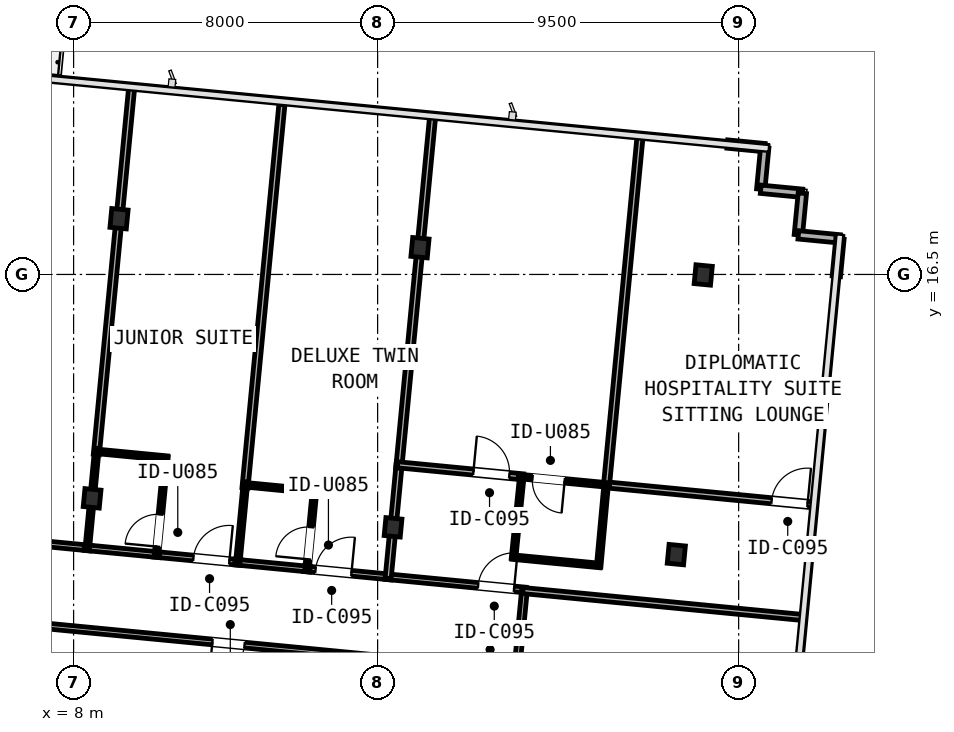
"""IFC4 building model, lengths in metres.
Left out: names, types, materials, properties, quantities, classifications, styles, units other than length and angle.
Written with IfcOpenShell. Run it as: python <this file> out.ifc"""

import sys

from ifc_helpers import new_model, si_unit, direction, frame, frame_2d, origin, origin_2d, place, context, subcontext, project, spatial, rectangle, i_section, extrude, element, fill, save


model = new_model("IFC4")
c1 = context("Model", 3, precision=1e-05, world=origin(), true_north=direction((0.0, 1.0)))
c2 = subcontext(c1, "Body", "Model", "MODEL_VIEW")
j1 = project(units=[si_unit("LENGTHUNIT", "METRE"), si_unit("PLANEANGLEUNIT", "RADIAN")], contexts=[c1])
p1 = place(None, origin())
s1 = spatial("IfcSite", under=j1, at=p1, CompositionType="ELEMENT")
p2 = place(p1, origin())
s2 = spatial("IfcBuilding", under=s1, at=p2, CompositionType="ELEMENT")
p3 = place(p2, frame((0.0, 0.0, 139.35)))
s3 = spatial("IfcBuildingStorey", under=s2, at=p3, CompositionType="ELEMENT", Elevation=139.35)
p4 = place(p3, frame((8.487, 10.609, 0.0), z_axis=(0.0, 0.0, 1.0), x_axis=(0.995396198367, -0.09584575252, 0.0)))
e1 = element("IfcColumn", 1, at=p4, inside=s3, PredefinedType="COLUMN", context=c2, shape_type="SweptSolid", body=[
    extrude(i_section(OverallWidth=0.424, OverallDepth=0.474, WebThickness=0.048, FlangeThickness=0.077, FilletRadius=0.031, at=origin_2d()), origin(), (0.0, 0.0, 1.0), 3.45),
])
p5 = place(p3, frame((9.195, 17.967, 0.0), z_axis=(0.0, 0.0, 1.0), x_axis=(0.995396198367, -0.09584575252, 0.0)))
e2 = element("IfcColumn", 2, at=p5, inside=s3, PredefinedType="COLUMN", context=c2, shape_type="SweptSolid", body=[
    extrude(i_section(OverallWidth=0.432, OverallDepth=0.498, WebThickness=0.056, FlangeThickness=0.089, FilletRadius=0.031, at=origin_2d()), origin(), (0.0, 0.0, 1.0), 3.45),
])
p6 = place(p3, frame((16.406, 9.846, 0.0), z_axis=(0.0, 0.0, 1.0), x_axis=(0.995396198367, -0.09584575252, 0.0)))
e3 = element("IfcColumn", 3, at=p6, inside=s3, PredefinedType="COLUMN", context=c2, shape_type="SweptSolid", body=[
    extrude(i_section(OverallWidth=0.424, OverallDepth=0.474, WebThickness=0.048, FlangeThickness=0.077, FilletRadius=0.031, at=origin_2d()), origin(), (0.0, 0.0, 1.0), 3.45),
])
for number, where, z_axis, x_axis in (
    (4, (17.115, 17.204, 0.0), (0.0, 0.0, 1.0), (0.995, -0.096, 0.0)),
    (5, (23.86, 9.128, 0.0), (0.0, 0.0, 1.0), (0.995, -0.096, 0.0)),
    (6, (24.568, 16.486, 0.0), (0.0, 0.0, 1.0), (0.995, -0.096, 0.0)),
):
    element("IfcColumn", number, at=place(p3, frame(where, z_axis=z_axis, x_axis=x_axis)), inside=s3, PredefinedType="COLUMN", context=c2, shape_type="SweptSolid", body=[
        extrude(i_section(OverallWidth=0.432, OverallDepth=0.498, WebThickness=0.056, FlangeThickness=0.089, FilletRadius=0.031, at=origin_2d()), origin(), (0.0, 0.0, 1.0), 3.45),
    ])
p7 = place(p3, frame((25.201, 19.931, 0.0), z_axis=(0.0, 0.0, 1.0), x_axis=(0.99541083642, -0.095693608655, 0.0)))
e7 = element("IfcWall", 7, at=p7, inside=s3, PredefinedType="STANDARD", context=c2, shape_type="SweptSolid", body=[
    extrude(rectangle(XDim=0.99, YDim=0.22, at=frame_2d((0.495, 0.0))), origin(), (0.0, 0.0, 1.0), 3.19),
])
p8 = place(p3, frame((26.187, 19.837, 0.0), z_axis=(0.0, 0.0, 1.0), x_axis=(-0.095657429048, -0.995414313875, 0.0)))
e8 = element("IfcWall", 8, at=p8, inside=s3, PredefinedType="STANDARD", context=c2, shape_type="SweptSolid", body=[
    extrude(rectangle(XDim=1.1, YDim=0.22, at=frame_2d((0.55, 0.0))), origin(), (0.0, 0.0, 1.0), 3.19),
])
p9 = place(p3, frame((26.082, 18.742, 0.0), z_axis=(0.0, 0.0, 1.0), x_axis=(0.995391116058, -0.095898519656, 0.0)))
e9 = element("IfcWall", 9, at=p9, inside=s3, PredefinedType="STANDARD", context=c2, shape_type="SweptSolid", body=[
    extrude(rectangle(XDim=1.1, YDim=0.22, at=frame_2d((0.55, 0.0))), origin(), (0.0, 0.0, 1.0), 3.19),
])
p10 = place(p3, frame((27.176, 18.636, 0.0), z_axis=(0.0, 0.0, 1.0), x_axis=(-0.095657429048, -0.995414313875, 0.0)))
e10 = element("IfcWall", 10, at=p10, inside=s3, PredefinedType="STANDARD", context=c2, shape_type="SweptSolid", body=[
    extrude(rectangle(XDim=1.1, YDim=0.22, at=frame_2d((0.55, 0.0))), origin(), (0.0, 0.0, 1.0), 3.19),
])
p11 = place(p3, frame((27.071, 17.541, 0.0), z_axis=(0.0, 0.0, 1.0), x_axis=(0.995391116058, -0.095898519656, 0.0)))
e11 = element("IfcWall", 11, at=p11, inside=s3, PredefinedType="STANDARD", context=c2, shape_type="SweptSolid", body=[
    extrude(rectangle(XDim=1.1, YDim=0.22, at=frame_2d((0.55, 0.0))), origin(), (0.0, 0.0, 1.0), 3.19),
])
p12 = place(p3, frame((28.166, 17.436, 0.0), z_axis=(0.0, 0.0, 1.0), x_axis=(-0.095693608655, -0.99541083642, 0.0)))
e12 = element("IfcWall", 12, at=p12, inside=s3, PredefinedType="STANDARD", context=c2, shape_type="SweptSolid", body=[
    extrude(rectangle(XDim=0.99, YDim=0.22, at=frame_2d((0.495, 0.0))), origin(), (0.0, 0.0, 1.0), 3.19),
])
p13 = place(p3, frame((2.799, 9.842, 0.0), z_axis=(0.0, 0.0, 1.0), x_axis=(0.995395844771, -0.095849424686, 0.0)))
e13 = element("IfcWall", 13, at=p13, inside=s3, PredefinedType="PARTITIONING", context=c2, shape_type="SweptSolid", body=[
    extrude(rectangle(XDim=5.67, YDim=0.15, at=frame_2d((2.835, 0.0))), origin(), (0.0, 0.0, 1.0), 2.479),
])
p14 = place(p13, frame((1.186, 0.0, 0.0)))
e14 = element("IfcOpeningElement", 14, at=p14, cuts=e13, PredefinedType="OPENING", context=c2, shape_type="SweptSolid", body=[
    extrude(rectangle(XDim=0.95, YDim=2.15, at=frame_2d((0.475, 1.075))), frame((0.0, 0.085, 0.0), z_axis=(0.0, -1.0, 0.0), x_axis=(1.0, 0.0, 0.0)), (0.0, 0.0, 1.0), 0.17),
])
p15 = place(p3, frame((10.101, 9.139, 0.0), z_axis=(0.0, 0.0, 1.0), x_axis=(0.995393345625, -0.095875374756, 0.0)))
e15 = element("IfcWall", 15, at=p15, inside=s3, PredefinedType="PARTITIONING", context=c2, shape_type="SweptSolid", body=[
    extrude(rectangle(XDim=2.312, YDim=0.15, at=frame_2d((1.156, 0.0))), origin(), (0.0, 0.0, 1.0), 2.718),
])
p16 = place(p15, frame((1.056, 0.0, 0.0)))
e16 = element("IfcOpeningElement", 16, at=p16, cuts=e15, PredefinedType="OPENING", context=c2, shape_type="SweptSolid", body=[
    extrude(rectangle(XDim=0.95, YDim=2.15, at=frame_2d((0.475, 1.075))), frame((0.0, 0.085, 0.0), z_axis=(0.0, -1.0, 0.0), x_axis=(1.0, 0.0, 0.0)), (0.0, 0.0, 1.0), 0.17),
])
p17 = place(p3, frame((8.28, 9.314, 0.0), z_axis=(0.0, 0.0, 1.0), x_axis=(0.995393086543, -0.095878064554, 0.0)))
e17 = element("IfcWall", 17, at=p17, inside=s3, PredefinedType="PARTITIONING", context=c2, shape_type="SweptSolid", body=[
    extrude(rectangle(XDim=1.994, YDim=0.15, at=frame_2d((0.997, 0.0))), origin(), (0.0, 0.0, 1.0), 2.479),
])
p18 = place(p3, frame((14.061, 8.758, 0.0), z_axis=(0.0, 0.0, 1.0), x_axis=(0.995393345625, -0.095875374756, 0.0)))
e18 = element("IfcWall", 18, at=p18, inside=s3, PredefinedType="PARTITIONING", context=c2, shape_type="SweptSolid", body=[
    extrude(rectangle(XDim=2.312, YDim=0.15, at=frame_2d((1.156, 0.0))), origin(), (0.0, 0.0, 1.0), 2.479),
])
p19 = place(p18, frame((0.306, 0.0, 0.0)))
e19 = element("IfcOpeningElement", 19, at=p19, cuts=e18, PredefinedType="OPENING", context=c2, shape_type="SweptSolid", body=[
    extrude(rectangle(XDim=0.95, YDim=2.15, at=frame_2d((0.475, 1.075))), frame((0.0, 0.085, 0.0), z_axis=(0.0, -1.0, 0.0), x_axis=(1.0, 0.0, 0.0)), (0.0, 0.0, 1.0), 0.17),
])
p20 = place(p3, frame((12.24, 8.933, 0.0), z_axis=(0.0, 0.0, 1.0), x_axis=(0.995405888026, -0.095745068196, 0.0)))
e20 = element("IfcWall", 20, at=p20, inside=s3, PredefinedType="PARTITIONING", context=c2, shape_type="SweptSolid", body=[
    extrude(rectangle(XDim=1.994, YDim=0.15, at=frame_2d((0.997, 0.0))), origin(), (0.0, 0.0, 1.0), 2.718),
])
p21 = place(p3, frame((16.199, 8.552, 0.0), z_axis=(0.0, 0.0, 1.0), x_axis=(0.995391104887, -0.095898635608, 0.0)))
e21 = element("IfcWall", 21, at=p21, inside=s3, PredefinedType="PARTITIONING", context=c2, shape_type="SweptSolid", body=[
    extrude(rectangle(XDim=3.722, YDim=0.15, at=frame_2d((1.861, 0.0))), origin(), (0.0, 0.0, 1.0), 2.479),
])
p22 = place(p21, frame((2.457, 0.0, 0.0)))
e22 = element("IfcOpeningElement", 22, at=p22, cuts=e21, PredefinedType="OPENING", context=c2, shape_type="SweptSolid", body=[
    extrude(rectangle(XDim=0.95, YDim=2.15, at=frame_2d((0.475, 1.075))), frame((0.0, 0.085, 0.0), z_axis=(0.0, -1.0, 0.0), x_axis=(1.0, 0.0, 0.0)), (0.0, 0.0, 1.0), 0.17),
])
p23 = place(p3, frame((16.156, 6.396, 0.0), z_axis=(0.0, 0.0, 1.0), x_axis=(-0.99539478422, 0.095860437863, 0.0)))
e23 = element("IfcWall", 23, at=p23, inside=s3, PredefinedType="PARTITIONING", context=c2, shape_type="SweptSolid", body=[
    extrude(rectangle(XDim=10.936, YDim=0.15, at=frame_2d((5.468, 0.0))), origin(), (0.0, 0.0, 1.0), 2.479),
])
p24 = place(p23, frame((3.675, 0.0, 0.0)))
e24 = element("IfcOpeningElement", 24, at=p24, cuts=e23, PredefinedType="OPENING", context=c2, shape_type="SweptSolid", body=[
    extrude(rectangle(XDim=0.85, YDim=2.05, at=frame_2d((0.425, 1.025))), frame((0.0, 0.085, 0.0), z_axis=(0.0, -1.0, 0.0), x_axis=(1.0, 0.0, 0.0)), (0.0, 0.0, 1.0), 0.17),
])
p25 = place(p3, frame((19.866, 8.219, 0.0), z_axis=(0.0, 0.0, 1.0), x_axis=(-0.095773447772, -0.995403157872, 0.0)))
e25 = element("IfcWall", 25, at=p25, inside=s3, PredefinedType="PARTITIONING", context=c2, shape_type="SweptSolid", body=[
    extrude(rectangle(XDim=2.21, YDim=0.15, at=frame_2d((1.105, 0.0))), origin(), (0.0, 0.0, 1.0), 2.718),
])
p26 = place(p3, frame((9.178, 17.791, 0.0), z_axis=(0.0, 0.0, 1.0), x_axis=(-0.095826863488, -0.995398016993, 0.0)))
e26 = element("IfcWall", 26, at=p26, inside=s3, PredefinedType="PARTITIONING", context=c2, shape_type="SweptSolid", body=[
    extrude(rectangle(XDim=6.056, YDim=0.16, at=frame_2d((3.028, 0.0))), origin(), (0.0, 0.0, 1.0), 2.479),
])
p27 = place(p3, frame((9.533, 21.47, 0.0), z_axis=(0.0, 0.0, 1.0), x_axis=(-0.095859866796, -0.995394839216, 0.0)))
e27 = element("IfcWall", 27, at=p27, inside=s3, PredefinedType="PARTITIONING", context=c2, shape_type="SweptSolid", body=[
    extrude(rectangle(XDim=3.344, YDim=0.16, at=frame_2d((1.672, 0.0))), origin(), (0.0, 0.0, 1.0), 3.19),
])
p28 = place(p3, frame((8.47, 10.433, 0.0), z_axis=(0.0, 0.0, 1.0), x_axis=(-0.095831494917, -0.995397571115, 0.0)))
e28 = element("IfcWall", 28, at=p28, inside=s3, PredefinedType="PARTITIONING", context=c2, shape_type="SweptSolid", body=[
    extrude(rectangle(XDim=1.172, YDim=0.12, at=frame_2d((0.586, 0.0))), origin(), (0.0, 0.0, 1.0), 2.479),
])
p29 = place(p3, frame((8.614, 11.927, 0.0), z_axis=(0.0, 0.0, 1.0), x_axis=(-0.09590284245, -0.99539069958, 0.0)))
e29 = element("IfcWall", 29, at=p29, inside=s3, PredefinedType="PARTITIONING", context=c2, shape_type="SweptSolid", body=[
    extrude(rectangle(XDim=1.148, YDim=0.12, at=frame_2d((0.574, 0.0))), origin(), (0.0, 0.0, 1.0), 2.479),
])
p30 = place(p3, frame((10.179, 9.091, 0.0), z_axis=(0.0, 0.0, 1.0), x_axis=(0.095799078022, 0.995400691506, 0.0)))
e30 = element("IfcWall", 30, at=p30, inside=s3, PredefinedType="PARTITIONING", context=c2, shape_type="SweptSolid", body=[
    extrude(rectangle(XDim=2.63, YDim=0.12, at=frame_2d((1.315, 0.0))), origin(), (0.0, 0.0, 1.0), 2.479),
])
p31 = place(p30, frame((0.247, 0.0, 0.0)))
e31 = element("IfcOpeningElement", 31, at=p31, cuts=e30, PredefinedType="OPENING", context=c2, shape_type="SweptSolid", body=[
    extrude(rectangle(XDim=0.85, YDim=2.1, at=frame_2d((0.425, 1.05))), frame((0.0, 0.07, 0.0), z_axis=(0.0, -1.0, 0.0), x_axis=(1.0, 0.0, 0.0)), (0.0, 0.0, 1.0), 0.14),
])
p32 = place(p3, frame((10.467, 11.666, 0.0), z_axis=(0.0, 0.0, 1.0), x_axis=(-0.995405983929, 0.095744071139, 0.0)))
e32 = element("IfcWall", 32, at=p32, inside=s3, PredefinedType="PARTITIONING", context=c2, shape_type="SweptSolid", body=[
    extrude(rectangle(XDim=1.91, YDim=0.12, at=frame_2d((0.955, 0.0))), origin(), (0.0, 0.0, 1.0), 2.479),
])
p33 = place(p3, frame((13.481, 20.97, 0.0), z_axis=(0.0, 0.0, 1.0), x_axis=(-0.095852900965, -0.995395510024, 0.0)))
e33 = element("IfcWall", 33, at=p33, inside=s3, PredefinedType="PARTITIONING", context=c2, shape_type="SweptSolid", body=[
    extrude(rectangle(XDim=10.132, YDim=0.16, at=frame_2d((5.066, 0.0))), origin(), (0.0, 0.0, 1.0), 2.557),
])
p34 = place(p3, frame((12.526, 11.048, 0.0), z_axis=(0.0, 0.0, 1.0), x_axis=(-0.095875173929, -0.995393364969, 0.0)))
e34 = element("IfcWall", 34, at=p34, inside=s3, PredefinedType="PARTITIONING", context=c2, shape_type="SweptSolid", body=[
    extrude(rectangle(XDim=2.172, YDim=0.12, at=frame_2d((1.086, 0.0))), origin(), (0.0, 0.0, 1.0), 2.479),
])
p35 = place(p3, frame((14.139, 8.71, 0.0), z_axis=(0.0, 0.0, 1.0), x_axis=(0.095825980341, 0.995398102013, 0.0)))
e35 = element("IfcWall", 35, at=p35, inside=s3, PredefinedType="PARTITIONING", context=c2, shape_type="SweptSolid", body=[
    extrude(rectangle(XDim=2.13, YDim=0.12, at=frame_2d((1.065, 0.0))), origin(), (0.0, 0.0, 1.0), 2.479),
])
p36 = place(p35, frame((0.296, 0.0, 0.0)))
e36 = element("IfcOpeningElement", 36, at=p36, cuts=e35, PredefinedType="OPENING", context=c2, shape_type="SweptSolid", body=[
    extrude(rectangle(XDim=0.85, YDim=2.1, at=frame_2d((0.425, 1.05))), frame((0.0, 0.07, 0.0), z_axis=(0.0, -1.0, 0.0), x_axis=(1.0, 0.0, 0.0)), (0.0, 0.0, 1.0), 0.14),
])
p37 = place(p3, frame((14.379, 10.787, 0.0), z_axis=(0.0, 0.0, 1.0), x_axis=(-0.995393793358, 0.095870726213, 0.0)))
e37 = element("IfcWall", 37, at=p37, inside=s3, PredefinedType="PARTITIONING", context=c2, shape_type="SweptSolid", body=[
    extrude(rectangle(XDim=1.91, YDim=0.12, at=frame_2d((0.955, 0.0))), origin(), (0.0, 0.0, 1.0), 2.718),
])
p38 = place(p3, frame((16.389, 9.671, 0.0), z_axis=(0.0, 0.0, 1.0), x_axis=(-0.095811626391, -0.995399483749, 0.0)))
e38 = element("IfcWall", 38, at=p38, inside=s3, PredefinedType="PARTITIONING", context=c2, shape_type="SweptSolid", body=[
    extrude(rectangle(XDim=1.172, YDim=0.16, at=frame_2d((0.586, 0.0))), origin(), (0.0, 0.0, 1.0), 2.479),
])
p39 = place(p3, frame((16.572, 11.57, 0.0), z_axis=(0.0, 0.0, 1.0), x_axis=(-0.095867871334, -0.99539406832, 0.0)))
e39 = element("IfcWall", 39, at=p39, inside=s3, PredefinedType="PARTITIONING", context=c2, shape_type="SweptSolid", body=[
    extrude(rectangle(XDim=1.556, YDim=0.16, at=frame_2d((0.778, 0.0))), origin(), (0.0, 0.0, 1.0), 2.479),
])
p40 = place(p3, frame((17.098, 17.029, 0.0), z_axis=(0.0, 0.0, 1.0), x_axis=(-0.095831010877, -0.995397617716, 0.0)))
e40 = element("IfcWall", 40, at=p40, inside=s3, PredefinedType="PARTITIONING", context=c2, shape_type="SweptSolid", body=[
    extrude(rectangle(XDim=5.648, YDim=0.16, at=frame_2d((2.824, 0.0))), origin(), (0.0, 0.0, 1.0), 2.479),
])
p41 = place(p3, frame((17.452, 20.708, 0.0), z_axis=(0.0, 0.0, 1.0), x_axis=(-0.095859866796, -0.995394839216, 0.0)))
e41 = element("IfcWall", 41, at=p41, inside=s3, PredefinedType="PARTITIONING", context=c2, shape_type="SweptSolid", body=[
    extrude(rectangle(XDim=3.344, YDim=0.16, at=frame_2d((1.672, 0.0))), origin(), (0.0, 0.0, 1.0), 3.19),
])
p42 = place(p3, frame((16.525, 11.492, 0.0), z_axis=(0.0, 0.0, 1.0), x_axis=(0.995395561935, -0.095852361889, 0.0)))
e42 = element("IfcWall", 42, at=p42, inside=s3, PredefinedType="PARTITIONING", context=c2, shape_type="SweptSolid", body=[
    extrude(rectangle(XDim=3.324, YDim=0.16, at=frame_2d((1.662, 0.0))), origin(), (0.0, 0.0, 1.0), 2.479),
])
p43 = place(p42, frame((2.004, 0.0, 0.0)))
e43 = element("IfcOpeningElement", 43, at=p43, cuts=e42, PredefinedType="OPENING", context=c2, shape_type="SweptSolid", body=[
    extrude(rectangle(XDim=0.95, YDim=2.15, at=frame_2d((0.475, 1.075))), frame((0.0, 0.09, 0.0), z_axis=(0.0, -1.0, 0.0), x_axis=(1.0, 0.0, 0.0)), (0.0, 0.0, 1.0), 0.18),
])
p44 = place(p3, frame((21.973, 10.968, 0.0), z_axis=(0.0, 0.0, 1.0), x_axis=(0.99539730528, -0.095834256092, 0.0)))
e44 = element("IfcWall", 44, at=p44, inside=s3, PredefinedType="PARTITIONING", context=c2, shape_type="SweptSolid", body=[
    extrude(rectangle(XDim=5.574, YDim=0.16, at=frame_2d((2.787, 0.0))), origin(), (0.0, 0.0, 1.0), 2.557),
])
p45 = place(p44, frame((4.414, 0.0, 0.0)))
e45 = element("IfcOpeningElement", 45, at=p45, cuts=e44, PredefinedType="OPENING", context=c2, shape_type="SweptSolid", body=[
    extrude(rectangle(XDim=0.95, YDim=2.15, at=frame_2d((0.475, 1.075))), frame((0.0, 0.09, 0.0), z_axis=(0.0, -1.0, 0.0), x_axis=(1.0, 0.0, 0.0)), (0.0, 0.0, 1.0), 0.18),
])
p46 = place(p3, frame((19.798, 11.217, 0.0), z_axis=(0.0, 0.0, 1.0), x_axis=(-0.100620321887, -0.994924897077, 0.0)))
e46 = element("IfcWall", 46, at=p46, inside=s3, PredefinedType="PARTITIONING", context=c2, shape_type="SweptSolid", body=[
    extrude(rectangle(XDim=2.208, YDim=0.12, at=frame_2d((1.104, 0.0))), origin(), (0.0, 0.0, 1.0), 2.479),
])
p47 = place(p3, frame((19.54, 9.064, 0.0), z_axis=(0.0, 0.0, 1.0), x_axis=(0.995393658532, -0.095872126059, 0.0)))
e47 = element("IfcWall", 47, at=p47, inside=s3, PredefinedType="PARTITIONING", context=c2, shape_type="SweptSolid", body=[
    extrude(rectangle(XDim=2.33, YDim=0.12, at=frame_2d((1.165, 0.0))), origin(), (0.0, 0.0, 1.0), 2.718),
])
p48 = place(p3, frame((21.816, 8.805, 0.0), z_axis=(0.0, 0.0, 1.0), x_axis=(0.09110395288, 0.995841387857, 0.0)))
e48 = element("IfcWall", 48, at=p48, inside=s3, PredefinedType="PARTITIONING", context=c2, shape_type="SweptSolid", body=[
    extrude(rectangle(XDim=2.208, YDim=0.12, at=frame_2d((1.104, 0.0))), origin(), (0.0, 0.0, 1.0), 2.479),
])
p49 = place(p3, frame((27.236, 7.469, 0.0), z_axis=(0.0, 0.0, 1.0), x_axis=(-0.995396228159, 0.095845443117, 0.0)))
e49 = element("IfcWall", 49, at=p49, inside=s3, PredefinedType="PARTITIONING", context=c2, shape_type="SweptSolid", body=[
    extrude(rectangle(XDim=7.448, YDim=0.16, at=frame_2d((3.724, 0.0))), origin(), (0.0, 0.0, 1.0), 2.557),
])
p50 = place(p3, frame((22.911, 20.182, 0.0), z_axis=(0.0, 0.0, 1.0), x_axis=(-0.095851937807, -0.995395602772, 0.0)))
e50 = element("IfcWall", 50, at=p50, inside=s3, PredefinedType="PARTITIONING", context=c2, shape_type="SweptSolid", body=[
    extrude(rectangle(XDim=9.302, YDim=0.16, at=frame_2d((4.651, 0.0))), origin(), (0.0, 0.0, 1.0), 2.557),
])
p51 = place(p3, frame((22.063, 10.959, 0.0), z_axis=(0.0, 0.0, 1.0), x_axis=(-0.995398273854, 0.095824195322, 0.0)))
e51 = element("IfcWall", 51, at=p51, inside=s3, PredefinedType="PARTITIONING", context=c2, shape_type="SweptSolid", body=[
    extrude(rectangle(XDim=2.372, YDim=0.12, at=frame_2d((1.186, 0.0))), origin(), (0.0, 0.0, 1.0), 2.718),
])
p52 = place(p51, frame((1.146, 0.0, 0.0)))
e52 = element("IfcOpeningElement", 52, at=p52, cuts=e51, PredefinedType="OPENING", context=c2, shape_type="SweptSolid", body=[
    extrude(rectangle(XDim=0.85, YDim=2.1, at=frame_2d((0.425, 1.05))), frame((0.0, 0.07, 0.0), z_axis=(0.0, -1.0, 0.0), x_axis=(1.0, 0.0, 0.0)), (0.0, 0.0, 1.0), 0.14),
])
p53 = place(p16, frame((0.95, 0.0, 0.0), z_axis=(0.0, 0.0, 1.0), x_axis=(-1.0, 0.0, 0.0)))
e53 = element("IfcDoor", 53, at=p53, inside=s3, OperationType="SINGLE_SWING_RIGHT", PredefinedType="DOOR", context=c2, shape_type="SweptSolid", body=[
    extrude(rectangle(XDim=0.95, YDim=2.15, at=frame_2d((0.475, 1.075))), frame((0.0, 0.025, 0.0), z_axis=(0.0, -1.0, 0.0), x_axis=(1.0, 0.0, 0.0)), (0.0, 0.0, 1.0), 0.05),
])
fill(e16, e53)
p54 = place(p31, frame((0.85, 0.0, 0.0), z_axis=(0.0, 0.0, 1.0), x_axis=(-1.0, 0.0, 0.0)))
e54 = element("IfcDoor", 54, at=p54, inside=s3, OperationType="SINGLE_SWING_LEFT", PredefinedType="DOOR", context=c2, shape_type="SweptSolid", body=[
    extrude(rectangle(XDim=0.85, YDim=2.1, at=frame_2d((0.425, 1.05))), frame((0.0, 0.025, 0.0), z_axis=(0.0, -1.0, 0.0), x_axis=(1.0, 0.0, 0.0)), (0.0, 0.0, 1.0), 0.05),
])
fill(e31, e54)
p55 = place(p19, frame((0.95, 0.0, 0.0), z_axis=(0.0, 0.0, 1.0), x_axis=(-1.0, 0.0, 0.0)))
e55 = element("IfcDoor", 55, at=p55, inside=s3, OperationType="SINGLE_SWING_RIGHT", PredefinedType="DOOR", context=c2, shape_type="SweptSolid", body=[
    extrude(rectangle(XDim=0.95, YDim=2.15, at=frame_2d((0.475, 1.075))), frame((0.0, 0.025, 0.0), z_axis=(0.0, -1.0, 0.0), x_axis=(1.0, 0.0, 0.0)), (0.0, 0.0, 1.0), 0.05),
])
fill(e19, e55)
p56 = place(p36, origin())
e56 = element("IfcDoor", 56, at=p56, inside=s3, OperationType="SINGLE_SWING_LEFT", PredefinedType="DOOR", context=c2, shape_type="SweptSolid", body=[
    extrude(rectangle(XDim=0.85, YDim=2.1, at=frame_2d((0.425, 1.05))), frame((0.0, 0.025, 0.0), z_axis=(0.0, -1.0, 0.0), x_axis=(1.0, 0.0, 0.0)), (0.0, 0.0, 1.0), 0.05),
])
fill(e36, e56)
p57 = place(p22, frame((0.95, 0.0, 0.0), z_axis=(0.0, 0.0, 1.0), x_axis=(-1.0, 0.0, 0.0)))
e57 = element("IfcDoor", 57, at=p57, inside=s3, OperationType="SINGLE_SWING_RIGHT", PredefinedType="DOOR", context=c2, shape_type="SweptSolid", body=[
    extrude(rectangle(XDim=0.95, YDim=2.15, at=frame_2d((0.475, 1.075))), frame((0.0, 0.025, 0.0), z_axis=(0.0, -1.0, 0.0), x_axis=(1.0, 0.0, 0.0)), (0.0, 0.0, 1.0), 0.05),
])
fill(e22, e57)
p58 = place(p43, origin())
e58 = element("IfcDoor", 58, at=p58, inside=s3, OperationType="SINGLE_SWING_LEFT", PredefinedType="DOOR", context=c2, shape_type="SweptSolid", body=[
    extrude(rectangle(XDim=0.95, YDim=2.15, at=frame_2d((0.475, 1.075))), frame((0.0, 0.025, 0.0), z_axis=(0.0, -1.0, 0.0), x_axis=(1.0, 0.0, 0.0)), (0.0, 0.0, 1.0), 0.05),
])
fill(e43, e58)
p59 = place(p45, origin())
e59 = element("IfcDoor", 59, at=p59, inside=s3, OperationType="SINGLE_SWING_RIGHT", PredefinedType="DOOR", context=c2, shape_type="SweptSolid", body=[
    extrude(rectangle(XDim=0.95, YDim=2.15, at=frame_2d((0.475, 1.075))), frame((0.0, 0.025, 0.0), z_axis=(0.0, -1.0, 0.0), x_axis=(1.0, 0.0, 0.0)), (0.0, 0.0, 1.0), 0.05),
])
fill(e45, e59)
p60 = place(p52, frame((0.85, 0.0, 0.0), z_axis=(0.0, 0.0, 1.0), x_axis=(-1.0, 0.0, 0.0)))
e60 = element("IfcDoor", 60, at=p60, inside=s3, OperationType="SINGLE_SWING_LEFT", PredefinedType="DOOR", context=c2, shape_type="SweptSolid", body=[
    extrude(rectangle(XDim=0.85, YDim=2.1, at=frame_2d((0.425, 1.05))), frame((0.0, 0.025, 0.0), z_axis=(0.0, -1.0, 0.0), x_axis=(1.0, 0.0, 0.0)), (0.0, 0.0, 1.0), 0.05),
])
fill(e52, e60)
p61 = place(p24, frame((0.85, 0.0, 0.0), z_axis=(0.0, 0.0, 1.0), x_axis=(-1.0, 0.0, 0.0)))
e61 = element("IfcDoor", 61, at=p61, inside=s3, OperationType="SINGLE_SWING_RIGHT", PredefinedType="DOOR", context=c2, shape_type="SweptSolid", body=[
    extrude(rectangle(XDim=0.85, YDim=2.05, at=frame_2d((0.425, 1.025))), frame((0.0, 0.025, 0.0), z_axis=(0.0, -1.0, 0.0), x_axis=(1.0, 0.0, 0.0)), (0.0, 0.0, 1.0), 0.05),
])
fill(e24, e61)
save(model, sys.argv[1])
